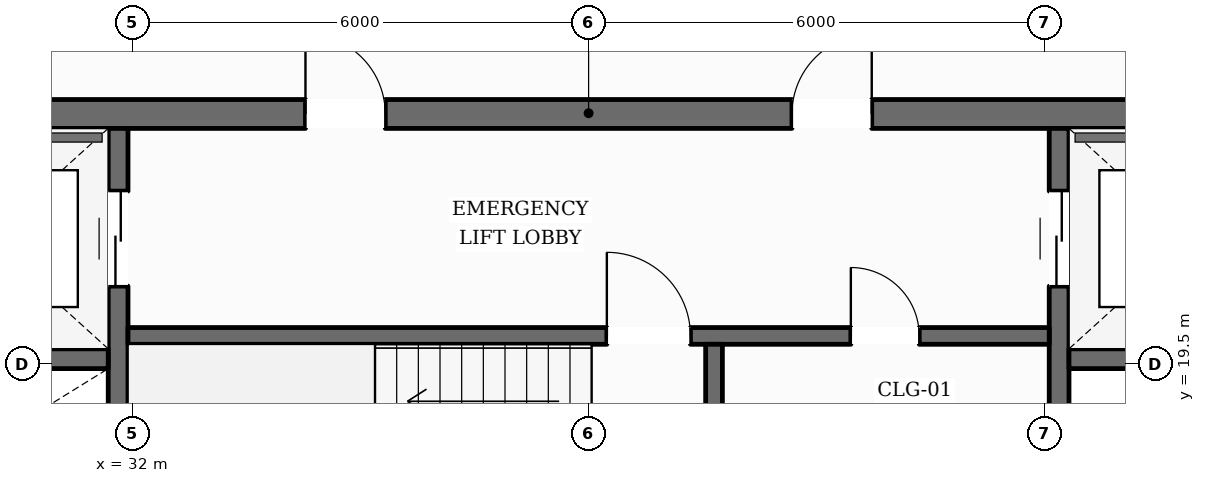
"""IFC4 building model, lengths in metres.
Left out: names, types, materials, properties, quantities, classifications, styles, units other than length and angle.
Written with IfcOpenShell. Run it as: python <this file> out.ifc"""

import sys

from ifc_helpers import new_model, si_unit, direction, frame, frame_2d, origin, place, context, subcontext, project, spatial, rectangle, extrude, element, fill, save


model = new_model("IFC4")
c1 = context("Model", 3, precision=1e-05, world=origin(), true_north=direction((0.0, 1.0)))
c2 = subcontext(c1, "Body", "Model", "MODEL_VIEW")
j1 = project(units=[si_unit("LENGTHUNIT", "METRE"), si_unit("PLANEANGLEUNIT", "RADIAN")], contexts=[c1])
p1 = place(None, origin())
s1 = spatial("IfcSite", under=j1, at=p1, CompositionType="ELEMENT")
p2 = place(p1, origin())
s2 = spatial("IfcBuilding", under=s1, at=p2, CompositionType="ELEMENT")
p3 = place(p2, frame((0.0, 0.0, 258.75)))
s3 = spatial("IfcBuildingStorey", under=s2, at=p3, CompositionType="ELEMENT", Elevation=258.75)
p4 = place(p3, frame((28.1, 22.79, 0.0), z_axis=(0.0, 0.0, 1.0), x_axis=(1.0, 0.0, 0.0)))
e1 = element("IfcWall", 1, at=p4, inside=s3, PredefinedType="SOLIDWALL", context=c2, shape_type="SweptSolid", body=[
    extrude(rectangle(XDim=19.8, YDim=0.38, at=frame_2d((9.9, 0.0))), origin(), (0.0, 0.0, 1.0), 3.61),
])
p5 = place(p4, frame((6.175, 0.0, 0.0)))
e2 = element("IfcOpeningElement", 2, at=p5, cuts=e1, PredefinedType="OPENING", context=c2, shape_type="SweptSolid", body=[
    extrude(rectangle(XDim=1.05, YDim=2.15, at=frame_2d((0.525, 1.075))), frame((0.0, 0.2, 0.0), z_axis=(0.0, -1.0, 0.0), x_axis=(1.0, 0.0, 0.0)), (0.0, 0.0, 1.0), 0.4),
])
p6 = place(p4, frame((12.575, 0.0, 0.0)))
e3 = element("IfcOpeningElement", 3, at=p6, cuts=e1, PredefinedType="OPENING", context=c2, shape_type="SweptSolid", body=[
    extrude(rectangle(XDim=1.05, YDim=2.15, at=frame_2d((0.525, 1.075))), frame((0.0, 0.2, 0.0), z_axis=(0.0, -1.0, 0.0), x_axis=(1.0, 0.0, 0.0)), (0.0, 0.0, 1.0), 0.4),
])
p7 = place(p3, frame((31.81, 9.6, 0.0), z_axis=(0.0, 0.0, 1.0), x_axis=(0.0, 1.0, 0.0)))
e4 = element("IfcWall", 4, at=p7, inside=s3, PredefinedType="SHEAR", context=c2, shape_type="SweptSolid", body=[
    extrude(rectangle(XDim=13.0, YDim=0.26, at=frame_2d((6.5, 0.0))), origin(), (0.0, 0.0, 1.0), 3.61),
])
p8 = place(p7, frame((10.925, 0.0, 0.0)))
e5 = element("IfcOpeningElement", 5, at=p8, cuts=e4, PredefinedType="OPENING", context=c2, shape_type="SweptSolid", body=[
    extrude(rectangle(XDim=1.25, YDim=2.25, at=frame_2d((0.625, 1.125))), frame((0.0, 0.14, 0.0), z_axis=(0.0, -1.0, 0.0), x_axis=(1.0, 0.0, 0.0)), (0.0, 0.0, 1.0), 0.28),
])
p9 = place(p3, frame((44.19, 9.6, 0.0), z_axis=(0.0, 0.0, 1.0), x_axis=(0.0, 1.0, 0.0)))
e6 = element("IfcWall", 6, at=p9, inside=s3, PredefinedType="SHEAR", context=c2, shape_type="SweptSolid", body=[
    extrude(rectangle(XDim=13.0, YDim=0.26, at=frame_2d((6.5, 0.0))), origin(), (0.0, 0.0, 1.0), 3.61),
])
p10 = place(p9, frame((10.925, 0.0, 0.0)))
e7 = element("IfcOpeningElement", 7, at=p10, cuts=e6, PredefinedType="OPENING", context=c2, shape_type="SweptSolid", body=[
    extrude(rectangle(XDim=1.25, YDim=2.25, at=frame_2d((0.625, 1.125))), frame((0.0, 0.14, 0.0), z_axis=(0.0, -1.0, 0.0), x_axis=(1.0, 0.0, 0.0)), (0.0, 0.0, 1.0), 0.28),
])
for number, where, z_axis, x_axis in (
    (8, (28.48, 19.57, 0.0), (0.0, 0.0, 1.0), (1.0, 0.0, 0.0)),
    (9, (44.32, 19.57, 0.0), (0.0, 0.0, 1.0), (1.0, 0.0, 0.0)),
):
    element("IfcWall", number, at=place(p3, frame(where, z_axis=z_axis, x_axis=x_axis)), inside=s3, PredefinedType="SHEAR", context=c2, shape_type="SweptSolid", body=[
        extrude(rectangle(XDim=3.2, YDim=0.26, at=frame_2d((1.6, 0.0))), origin(), (0.0, 0.0, 1.0), 3.61),
    ])
p11 = place(p3, frame((31.94, 19.87, 0.0), z_axis=(0.0, 0.0, 1.0), x_axis=(1.0, 0.0, 0.0)))
e10 = element("IfcWall", 10, at=p11, inside=s3, PredefinedType="SOLIDWALL", context=c2, shape_type="SweptSolid", body=[
    extrude(rectangle(XDim=12.12, YDim=0.22, at=frame_2d((6.06, 0.0))), origin(), (0.0, 0.0, 1.0), 3.61),
])
p12 = place(p11, frame((6.3, 0.0, 0.0)))
e11 = element("IfcOpeningElement", 11, at=p12, cuts=e10, PredefinedType="OPENING", context=c2, shape_type="SweptSolid", body=[
    extrude(rectangle(XDim=1.1, YDim=2.15, at=frame_2d((0.55, 1.075))), frame((0.0, 0.12, 0.0), z_axis=(0.0, -1.0, 0.0), x_axis=(1.0, 0.0, 0.0)), (0.0, 0.0, 1.0), 0.24),
])
p13 = place(p11, frame((9.51, 0.0, 0.0)))
e12 = element("IfcOpeningElement", 12, at=p13, cuts=e10, PredefinedType="OPENING", context=c2, shape_type="SweptSolid", body=[
    extrude(rectangle(XDim=0.9, YDim=2.1, at=frame_2d((0.45, 1.05))), frame((0.0, 0.12, 0.0), z_axis=(0.0, -1.0, 0.0), x_axis=(1.0, 0.0, 0.0)), (0.0, 0.0, 1.0), 0.24),
])
p14 = place(p3, frame((39.65, 16.56, 0.0), z_axis=(0.0, 0.0, 1.0), x_axis=(0.0, 1.0, 0.0)))
e13 = element("IfcWall", 13, at=p14, inside=s3, PredefinedType="SOLIDWALL", context=c2, shape_type="SweptSolid", body=[
    extrude(rectangle(XDim=3.2, YDim=0.22, at=frame_2d((1.6, 0.0))), origin(), (0.0, 0.0, 1.0), 3.61),
])
p15 = place(p3, frame((16.214, 11.135, 0.0), z_axis=(0.0, 0.0, 1.0), x_axis=(0.49510347201, 0.868834018673, 0.0)))
e14 = element("IfcWall", 14, at=p15, inside=s3, PredefinedType="STANDARD", context=c2, shape_type="SweptSolid", body=[
    extrude(rectangle(XDim=37.643, YDim=0.35, at=frame_2d((18.822, 0.0))), origin(), (0.0, 0.0, 1.0), 3.196),
])
p16 = place(p15, frame((33.429, 0.0, 0.65)))
e15 = element("IfcOpeningElement", 15, at=p16, cuts=e14, PredefinedType="OPENING", context=c2, shape_type="SweptSolid", body=[
    extrude(rectangle(XDim=1.35, YDim=1.75, at=frame_2d((0.675, 0.875))), frame((0.0, 0.185, 0.0), z_axis=(0.0, -1.0, 0.0), x_axis=(1.0, 0.0, 0.0)), (0.0, 0.0, 1.0), 0.37),
])
p17 = place(p15, frame((27.315, 0.0, 0.65)))
e16 = element("IfcOpeningElement", 16, at=p17, cuts=e14, PredefinedType="OPENING", context=c2, shape_type="SweptSolid", body=[
    extrude(rectangle(XDim=1.35, YDim=1.75, at=frame_2d((0.675, 0.875))), frame((0.0, 0.185, 0.0), z_axis=(0.0, -1.0, 0.0), x_axis=(1.0, 0.0, 0.0)), (0.0, 0.0, 1.0), 0.37),
])
p18 = place(p15, frame((15.087, 0.0, 0.65)))
e17 = element("IfcOpeningElement", 17, at=p18, cuts=e14, PredefinedType="OPENING", context=c2, shape_type="SweptSolid", body=[
    extrude(rectangle(XDim=1.35, YDim=1.75, at=frame_2d((0.675, 0.875))), frame((0.0, 0.185, 0.0), z_axis=(0.0, -1.0, 0.0), x_axis=(1.0, 0.0, 0.0)), (0.0, 0.0, 1.0), 0.37),
])
p19 = place(p15, frame((8.973, 0.0, 0.65)))
e18 = element("IfcOpeningElement", 18, at=p19, cuts=e14, PredefinedType="OPENING", context=c2, shape_type="SweptSolid", body=[
    extrude(rectangle(XDim=1.35, YDim=1.75, at=frame_2d((0.675, 0.875))), frame((0.0, 0.185, 0.0), z_axis=(0.0, -1.0, 0.0), x_axis=(1.0, 0.0, 0.0)), (0.0, 0.0, 1.0), 0.37),
])
p20 = place(p15, frame((2.859, 0.0, 0.65)))
e19 = element("IfcOpeningElement", 19, at=p20, cuts=e14, PredefinedType="OPENING", context=c2, shape_type="SweptSolid", body=[
    extrude(rectangle(XDim=1.35, YDim=1.75, at=frame_2d((0.675, 0.875))), frame((0.0, 0.185, 0.0), z_axis=(0.0, -1.0, 0.0), x_axis=(1.0, 0.0, 0.0)), (0.0, 0.0, 1.0), 0.37),
])
p21 = place(p3, frame((41.284, 43.76, 0.0), z_axis=(0.0, 0.0, 1.0), x_axis=(0.50479404613, -0.863239810824, 0.0)))
e20 = element("IfcWall", 20, at=p21, inside=s3, PredefinedType="STANDARD", context=c2, shape_type="SweptSolid", body=[
    extrude(rectangle(XDim=38.372, YDim=0.35, at=frame_2d((19.186, 0.0))), origin(), (0.0, 0.0, 1.0), 3.196),
])
p22 = place(p21, frame((34.102, 0.0, 0.65)))
e21 = element("IfcOpeningElement", 21, at=p22, cuts=e20, PredefinedType="OPENING", context=c2, shape_type="SweptSolid", body=[
    extrude(rectangle(XDim=1.35, YDim=1.75, at=frame_2d((0.675, 0.875))), frame((0.0, 0.185, 0.0), z_axis=(0.0, -1.0, 0.0), x_axis=(1.0, 0.0, 0.0)), (0.0, 0.0, 1.0), 0.37),
])
p23 = place(p21, frame((27.864, 0.0, 0.65)))
e22 = element("IfcOpeningElement", 22, at=p23, cuts=e20, PredefinedType="OPENING", context=c2, shape_type="SweptSolid", body=[
    extrude(rectangle(XDim=1.35, YDim=1.75, at=frame_2d((0.675, 0.875))), frame((0.0, 0.185, 0.0), z_axis=(0.0, -1.0, 0.0), x_axis=(1.0, 0.0, 0.0)), (0.0, 0.0, 1.0), 0.37),
])
p24 = place(p21, frame((15.39, 0.0, 0.65)))
e23 = element("IfcOpeningElement", 23, at=p24, cuts=e20, PredefinedType="OPENING", context=c2, shape_type="SweptSolid", body=[
    extrude(rectangle(XDim=1.35, YDim=1.75, at=frame_2d((0.675, 0.875))), frame((0.0, 0.185, 0.0), z_axis=(0.0, -1.0, 0.0), x_axis=(1.0, 0.0, 0.0)), (0.0, 0.0, 1.0), 0.37),
])
p25 = place(p21, frame((9.153, 0.0, 0.65)))
e24 = element("IfcOpeningElement", 24, at=p25, cuts=e20, PredefinedType="OPENING", context=c2, shape_type="SweptSolid", body=[
    extrude(rectangle(XDim=1.35, YDim=1.75, at=frame_2d((0.675, 0.875))), frame((0.0, 0.185, 0.0), z_axis=(0.0, -1.0, 0.0), x_axis=(1.0, 0.0, 0.0)), (0.0, 0.0, 1.0), 0.37),
])
p26 = place(p21, frame((2.915, 0.0, 0.65)))
e25 = element("IfcOpeningElement", 25, at=p26, cuts=e20, PredefinedType="OPENING", context=c2, shape_type="SweptSolid", body=[
    extrude(rectangle(XDim=1.35, YDim=1.75, at=frame_2d((0.675, 0.875))), frame((0.0, 0.185, 0.0), z_axis=(0.0, -1.0, 0.0), x_axis=(1.0, 0.0, 0.0)), (0.0, 0.0, 1.0), 0.37),
])
p27 = place(p12, origin())
e26 = element("IfcDoor", 26, at=p27, inside=s3, OperationType="SINGLE_SWING_LEFT", PredefinedType="DOOR", context=c2, shape_type="SweptSolid", body=[
    extrude(rectangle(XDim=1.1, YDim=2.15, at=frame_2d((0.55, 1.075))), frame((0.0, 0.025, 0.0), z_axis=(0.0, -1.0, 0.0), x_axis=(1.0, 0.0, 0.0)), (0.0, 0.0, 1.0), 0.05),
])
fill(e11, e26)
p28 = place(p5, origin())
e27 = element("IfcDoor", 27, at=p28, inside=s3, OperationType="SINGLE_SWING_LEFT", PredefinedType="DOOR", context=c2, shape_type="SweptSolid", body=[
    extrude(rectangle(XDim=1.05, YDim=2.15, at=frame_2d((0.525, 1.075))), frame((0.0, 0.025, 0.0), z_axis=(0.0, -1.0, 0.0), x_axis=(1.0, 0.0, 0.0)), (0.0, 0.0, 1.0), 0.05),
])
fill(e2, e27)
p29 = place(p6, origin())
e28 = element("IfcDoor", 28, at=p29, inside=s3, OperationType="SINGLE_SWING_RIGHT", PredefinedType="DOOR", context=c2, shape_type="SweptSolid", body=[
    extrude(rectangle(XDim=1.05, YDim=2.15, at=frame_2d((0.525, 1.075))), frame((0.0, 0.025, 0.0), z_axis=(0.0, -1.0, 0.0), x_axis=(1.0, 0.0, 0.0)), (0.0, 0.0, 1.0), 0.05),
])
fill(e3, e28)
p30 = place(p8, origin())
e29 = element("IfcDoor", 29, at=p30, inside=s3, OperationType="DOUBLE_DOOR_SLIDING", PredefinedType="DOOR", context=c2, shape_type="SweptSolid", body=[
    extrude(rectangle(XDim=1.25, YDim=2.25, at=frame_2d((0.625, 1.125))), frame((0.0, 0.025, 0.0), z_axis=(0.0, -1.0, 0.0), x_axis=(1.0, 0.0, 0.0)), (0.0, 0.0, 1.0), 0.05),
])
fill(e5, e29)
p31 = place(p10, origin())
e30 = element("IfcDoor", 30, at=p31, inside=s3, OperationType="DOUBLE_DOOR_SLIDING", PredefinedType="DOOR", context=c2, shape_type="SweptSolid", body=[
    extrude(rectangle(XDim=1.25, YDim=2.25, at=frame_2d((0.625, 1.125))), frame((0.0, 0.025, 0.0), z_axis=(0.0, -1.0, 0.0), x_axis=(1.0, 0.0, 0.0)), (0.0, 0.0, 1.0), 0.05),
])
fill(e7, e30)
p32 = place(p13, origin())
e31 = element("IfcDoor", 31, at=p32, inside=s3, OperationType="SINGLE_SWING_LEFT", PredefinedType="DOOR", context=c2, shape_type="SweptSolid", body=[
    extrude(rectangle(XDim=0.9, YDim=2.1, at=frame_2d((0.45, 1.05))), frame((0.0, 0.025, 0.0), z_axis=(0.0, -1.0, 0.0), x_axis=(1.0, 0.0, 0.0)), (0.0, 0.0, 1.0), 0.05),
])
fill(e12, e31)
save(model, sys.argv[1])
